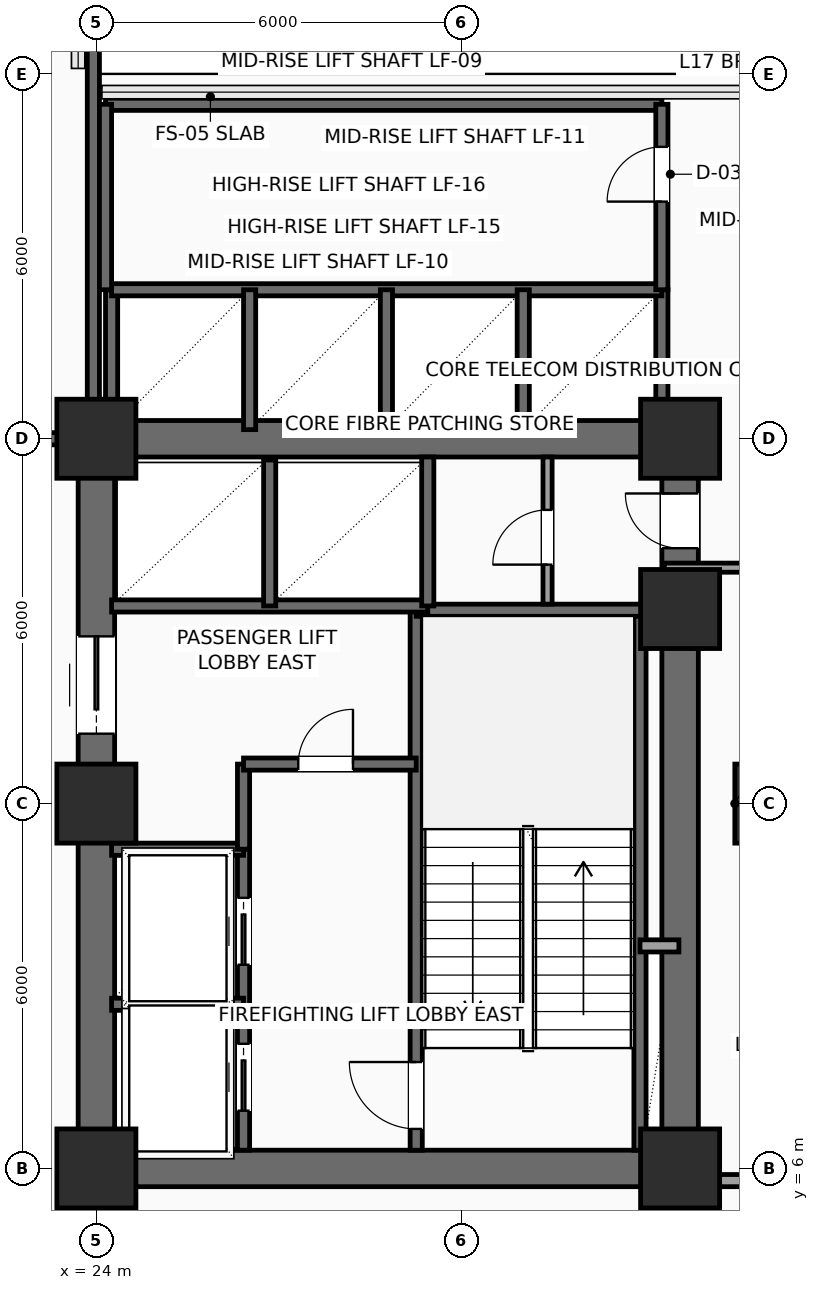
"""IFC4 building model, lengths in metres.
Left out: names, types, materials, properties, quantities, classifications, styles, units other than length and angle.
Written with IfcOpenShell. Run it as: python <this file> out.ifc"""

import sys

from ifc_helpers import new_model, si_unit, direction, frame, frame_2d, origin, origin_2d, place, context, subcontext, project, spatial, rectangle, extrude, element, fill, save


model = new_model("IFC4")
c1 = context("Model", 3, precision=1e-05, world=origin(), true_north=direction((0.0, 1.0)))
c2 = subcontext(c1, "Body", "Model", "MODEL_VIEW")
j1 = project(units=[si_unit("LENGTHUNIT", "METRE"), si_unit("PLANEANGLEUNIT", "RADIAN")], contexts=[c1])
p1 = place(None, origin())
s1 = spatial("IfcSite", under=j1, at=p1, CompositionType="ELEMENT")
p2 = place(p1, origin())
s2 = spatial("IfcBuilding", under=s1, at=p2, CompositionType="ELEMENT")
p3 = place(p2, frame((0.0, 0.0, 75.3)))
s3 = spatial("IfcBuildingStorey", under=s2, at=p3, CompositionType="ELEMENT", Elevation=75.3)
for number, where, z_axis, x_axis in (
    (1, (24.0, 6.0, 0.0), (0.0, 0.0, 1.0), (1.0, 0.0, 0.0)),
    (2, (24.0, 12.0, 0.0), (0.0, 0.0, 1.0), (1.0, 0.0, 0.0)),
    (3, (24.0, 18.0, 0.0), (0.0, 0.0, 1.0), (1.0, 0.0, 0.0)),
    (4, (33.6, 6.0, 0.0), (0.0, 0.0, 1.0), (1.0, 0.0, 0.0)),
    (5, (33.6, 15.2, 0.0), (0.0, 0.0, 1.0), (1.0, 0.0, 0.0)),
    (6, (33.6, 18.0, 0.0), (0.0, 0.0, 1.0), (1.0, 0.0, 0.0)),
    (7, (35.15, 12.0, 0.0), (0.0, 0.0, 1.0), (1.0, 0.0, 0.0)),
):
    element("IfcColumn", number, at=place(p3, frame(where, z_axis=z_axis, x_axis=x_axis)), inside=s3, PredefinedType="COLUMN", context=c2, shape_type="SweptSolid", body=[
        extrude(rectangle(XDim=1.3, YDim=1.3, at=origin_2d()), origin(), (0.0, 0.0, 1.0), 3.9),
    ])
for number, where, z_axis, x_axis in (
    (8, (24.0, 6.0, 0.0), (0.0, 0.0, 1.0), (1.0, 0.0, 0.0)),
    (9, (24.0, 18.0, 0.0), (0.0, 0.0, 1.0), (1.0, 0.0, 0.0)),
):
    element("IfcWall", number, at=place(p3, frame(where, z_axis=z_axis, x_axis=x_axis)), inside=s3, PredefinedType="SHEAR", context=c2, shape_type="SweptSolid", body=[
        extrude(rectangle(XDim=9.6, YDim=0.6, at=frame_2d((4.8, 0.0))), origin(), (0.0, 0.0, 1.0), 3.65),
    ])
p4 = place(p3, frame((24.0, 6.0, 0.0), z_axis=(0.0, 0.0, 1.0), x_axis=(0.0, 1.0, 0.0)))
e10 = element("IfcWall", 10, at=p4, inside=s3, PredefinedType="SHEAR", context=c2, shape_type="SweptSolid", body=[
    extrude(rectangle(XDim=12.0, YDim=0.6, at=frame_2d((6.0, 0.0))), origin(), (0.0, 0.0, 1.0), 3.65),
])
p5 = place(p4, frame((7.15, 0.0, 0.0)))
e11 = element("IfcOpeningElement", 11, at=p5, cuts=e10, PredefinedType="OPENING", context=c2, shape_type="SweptSolid", body=[
    extrude(rectangle(XDim=1.6, YDim=2.3, at=frame_2d((0.8, 1.15))), frame((0.0, 0.31, 0.0), z_axis=(0.0, -1.0, 0.0), x_axis=(1.0, 0.0, 0.0)), (0.0, 0.0, 1.0), 0.62),
])
p6 = place(p3, frame((33.6, 6.0, 0.0), z_axis=(0.0, 0.0, 1.0), x_axis=(0.0, 1.0, 0.0)))
e12 = element("IfcWall", 12, at=p6, inside=s3, PredefinedType="SHEAR", context=c2, shape_type="SweptSolid", body=[
    extrude(rectangle(XDim=12.0, YDim=0.6, at=frame_2d((6.0, 0.0))), origin(), (0.0, 0.0, 1.0), 3.65),
])
p7 = place(p6, frame((10.2, 0.0, 0.0)))
e13 = element("IfcOpeningElement", 13, at=p7, cuts=e12, PredefinedType="OPENING", context=c2, shape_type="SweptSolid", body=[
    extrude(rectangle(XDim=0.9, YDim=2.15, at=frame_2d((0.45, 1.075))), frame((0.0, 0.31, 0.0), z_axis=(0.0, -1.0, 0.0), x_axis=(1.0, 0.0, 0.0)), (0.0, 0.0, 1.0), 0.62),
])
p8 = place(p3, frame((29.26, 6.3, 0.0), z_axis=(0.0, 0.0, 1.0), x_axis=(0.0, 1.0, 0.0)))
e14 = element("IfcWall", 14, at=p8, inside=s3, PredefinedType="SHEAR", context=c2, shape_type="SweptSolid", body=[
    extrude(rectangle(XDim=8.88, YDim=0.2, at=frame_2d((4.44, 0.0))), origin(), (0.0, 0.0, 1.0), 3.65),
])
p9 = place(p8, frame((0.35, 0.0, 0.0)))
e15 = element("IfcOpeningElement", 15, at=p9, cuts=e14, PredefinedType="OPENING", context=c2, shape_type="SweptSolid", body=[
    extrude(rectangle(XDim=1.1, YDim=2.2, at=frame_2d((0.55, 1.1))), frame((0.0, 0.11, 0.0), z_axis=(0.0, -1.0, 0.0), x_axis=(1.0, 0.0, 0.0)), (0.0, 0.0, 1.0), 0.22),
])
p10 = place(p3, frame((32.94, 6.3, 0.0), z_axis=(0.0, 0.0, 1.0), x_axis=(0.0, 1.0, 0.0)))
e16 = element("IfcWall", 16, at=p10, inside=s3, PredefinedType="SHEAR", context=c2, shape_type="SweptSolid", body=[
    extrude(rectangle(XDim=8.88, YDim=0.2, at=frame_2d((4.44, 0.0))), origin(), (0.0, 0.0, 1.0), 3.65),
])
p11 = place(p3, frame((29.26, 15.18, 0.0), z_axis=(0.0, 0.0, 1.0), x_axis=(1.0, 0.0, 0.0)))
e17 = element("IfcWall", 17, at=p11, inside=s3, PredefinedType="SHEAR", context=c2, shape_type="SweptSolid", body=[
    extrude(rectangle(XDim=4.04, YDim=0.2, at=frame_2d((2.02, 0.0))), origin(), (0.0, 0.0, 1.0), 3.65),
])
p12 = place(p3, frame((26.42, 6.3, 0.0), z_axis=(0.0, 0.0, 1.0), x_axis=(0.0, 1.0, 0.0)))
e18 = element("IfcWall", 18, at=p12, inside=s3, PredefinedType="SHEAR", context=c2, shape_type="SweptSolid", body=[
    extrude(rectangle(XDim=4.95, YDim=0.2, at=frame_2d((2.475, 0.0))), origin(), (0.0, 0.0, 1.0), 3.65),
])
p13 = place(p12, frame((0.65, 0.0, 0.0)))
e19 = element("IfcOpeningElement", 19, at=p13, cuts=e18, PredefinedType="OPENING", context=c2, shape_type="SweptSolid", body=[
    extrude(rectangle(XDim=1.1, YDim=2.2, at=frame_2d((0.55, 1.1))), frame((0.0, 0.11, 0.0), z_axis=(0.0, -1.0, 0.0), x_axis=(1.0, 0.0, 0.0)), (0.0, 0.0, 1.0), 0.22),
])
p14 = place(p12, frame((3.05, 0.0, 0.0)))
e20 = element("IfcOpeningElement", 20, at=p14, cuts=e18, PredefinedType="OPENING", context=c2, shape_type="SweptSolid", body=[
    extrude(rectangle(XDim=1.1, YDim=2.2, at=frame_2d((0.55, 1.1))), frame((0.0, 0.11, 0.0), z_axis=(0.0, -1.0, 0.0), x_axis=(1.0, 0.0, 0.0)), (0.0, 0.0, 1.0), 0.22),
])
for number, where, z_axis, x_axis in (
    (21, (24.25, 8.7, 0.0), (0.0, 0.0, 1.0), (1.0, 0.0, 0.0)),
    (22, (24.25, 11.25, 0.0), (0.0, 0.0, 1.0), (1.0, 0.0, 0.0)),
):
    element("IfcWall", number, at=place(p3, frame(where, z_axis=z_axis, x_axis=x_axis)), inside=s3, PredefinedType="SHEAR", context=c2, shape_type="SweptSolid", body=[
        extrude(rectangle(XDim=2.17, YDim=0.2, at=frame_2d((1.085, 0.0))), origin(), (0.0, 0.0, 1.0), 3.65),
    ])
p15 = place(p3, frame((26.42, 11.25, 0.0), z_axis=(0.0, 0.0, 1.0), x_axis=(0.0, 1.0, 0.0)))
e23 = element("IfcWall", 23, at=p15, inside=s3, PredefinedType="SHEAR", context=c2, shape_type="SweptSolid", body=[
    extrude(rectangle(XDim=1.4, YDim=0.2, at=frame_2d((0.7, 0.0))), origin(), (0.0, 0.0, 1.0), 3.65),
])
p16 = place(p3, frame((26.42, 12.65, 0.0), z_axis=(0.0, 0.0, 1.0), x_axis=(1.0, 0.0, 0.0)))
e24 = element("IfcWall", 24, at=p16, inside=s3, PredefinedType="SHEAR", context=c2, shape_type="SweptSolid", body=[
    extrude(rectangle(XDim=2.84, YDim=0.2, at=frame_2d((1.42, 0.0))), origin(), (0.0, 0.0, 1.0), 3.65),
])
p17 = place(p16, frame((0.9, 0.0, 0.0)))
e25 = element("IfcOpeningElement", 25, at=p17, cuts=e24, PredefinedType="OPENING", context=c2, shape_type="SweptSolid", body=[
    extrude(rectangle(XDim=0.9, YDim=2.15, at=frame_2d((0.45, 1.075))), frame((0.0, 0.11, 0.0), z_axis=(0.0, -1.0, 0.0), x_axis=(1.0, 0.0, 0.0)), (0.0, 0.0, 1.0), 0.22),
])
p18 = place(p3, frame((32.94, 9.66, 0.0), z_axis=(0.0, 0.0, 1.0), x_axis=(1.0, 0.0, 0.0)))
e26 = element("IfcWall", 26, at=p18, inside=s3, PredefinedType="SOLIDWALL", context=c2, shape_type="SweptSolid", body=[
    extrude(rectangle(XDim=0.64, YDim=0.2, at=frame_2d((0.32, 0.0))), origin(), (0.0, 0.0, 1.0), 3.65),
])
p19 = place(p3, frame((24.25, 15.25, 0.0), z_axis=(0.0, 0.0, 1.0), x_axis=(1.0, 0.0, 0.0)))
e27 = element("IfcWall", 27, at=p19, inside=s3, PredefinedType="SHEAR", context=c2, shape_type="SweptSolid", body=[
    extrude(rectangle(XDim=5.2, YDim=0.2, at=frame_2d((2.6, 0.0))), origin(), (0.0, 0.0, 1.0), 3.65),
])
p20 = place(p3, frame((26.85, 15.25, 0.0), z_axis=(0.0, 0.0, 1.0), x_axis=(0.0, 1.0, 0.0)))
e28 = element("IfcWall", 28, at=p20, inside=s3, PredefinedType="SHEAR", context=c2, shape_type="SweptSolid", body=[
    extrude(rectangle(XDim=2.4, YDim=0.2, at=frame_2d((1.2, 0.0))), origin(), (0.0, 0.0, 1.0), 3.65),
])
p21 = place(p3, frame((29.45, 15.25, 0.0), z_axis=(0.0, 0.0, 1.0), x_axis=(0.0, 1.0, 0.0)))
e29 = element("IfcWall", 29, at=p21, inside=s3, PredefinedType="SHEAR", context=c2, shape_type="SweptSolid", body=[
    extrude(rectangle(XDim=2.45, YDim=0.2, at=frame_2d((1.225, 0.0))), origin(), (0.0, 0.0, 1.0), 3.65),
])
p22 = place(p3, frame((31.42, 15.28, 0.0), z_axis=(0.0, 0.0, 1.0), x_axis=(0.0, 1.0, 0.0)))
e30 = element("IfcWall", 30, at=p22, inside=s3, PredefinedType="PARTITIONING", context=c2, shape_type="SweptSolid", body=[
    extrude(rectangle(XDim=2.42, YDim=0.15, at=frame_2d((1.21, 0.0))), origin(), (0.0, 0.0, 1.0), 3.65),
])
p23 = place(p22, frame((0.65, 0.0, 0.0)))
e31 = element("IfcOpeningElement", 31, at=p23, cuts=e30, PredefinedType="OPENING", context=c2, shape_type="SweptSolid", body=[
    extrude(rectangle(XDim=0.9, YDim=2.15, at=frame_2d((0.45, 1.075))), frame((0.0, 0.085, 0.0), z_axis=(0.0, -1.0, 0.0), x_axis=(1.0, 0.0, 0.0)), (0.0, 0.0, 1.0), 0.17),
])
p24 = place(p3, frame((20.45, 18.0, 0.0), z_axis=(0.0, 0.0, 1.0), x_axis=(1.0, 0.0, 0.0)))
e32 = element("IfcWall", 32, at=p24, inside=s3, PredefinedType="SHEAR", context=c2, shape_type="SweptSolid", body=[
    extrude(rectangle(XDim=3.5, YDim=0.2, at=frame_2d((1.75, 0.0))), origin(), (0.0, 0.0, 1.0), 3.65),
])
p25 = place(p24, frame((0.95, 0.0, 0.0)))
e33 = element("IfcOpeningElement", 33, at=p25, cuts=e32, PredefinedType="OPENING", context=c2, shape_type="SweptSolid", body=[
    extrude(rectangle(XDim=1.6, YDim=2.3, at=frame_2d((0.8, 1.15))), frame((0.0, 0.11, 0.0), z_axis=(0.0, -1.0, 0.0), x_axis=(1.0, 0.0, 0.0)), (0.0, 0.0, 1.0), 0.22),
])
p26 = place(p3, frame((23.95, 18.0, 0.0), z_axis=(0.0, 0.0, 1.0), x_axis=(0.0, 1.0, 0.0)))
e34 = element("IfcWall", 34, at=p26, inside=s3, PredefinedType="SHEAR", context=c2, shape_type="SweptSolid", body=[
    extrude(rectangle(XDim=9.3, YDim=0.2, at=frame_2d((4.65, 0.0))), origin(), (0.0, 0.0, 1.0), 3.65),
])
for number, where, z_axis, x_axis in (
    (35, (33.3, 18.1, 0.0), (0.0, 0.0, 1.0), (0.0, 1.0, 0.0)),
    (36, (24.25, 18.1, 0.0), (0.0, 0.0, 1.0), (0.0, 1.0, 0.0)),
):
    element("IfcWall", number, at=place(p3, frame(where, z_axis=z_axis, x_axis=x_axis)), inside=s3, PredefinedType="SHEAR", context=c2, shape_type="SweptSolid", body=[
        extrude(rectangle(XDim=2.35, YDim=0.2, at=frame_2d((1.175, 0.0))), origin(), (0.0, 0.0, 1.0), 3.65),
    ])
p27 = place(p3, frame((24.25, 20.45, 0.0), z_axis=(0.0, 0.0, 1.0), x_axis=(1.0, 0.0, 0.0)))
e37 = element("IfcWall", 37, at=p27, inside=s3, PredefinedType="SHEAR", context=c2, shape_type="SweptSolid", body=[
    extrude(rectangle(XDim=9.05, YDim=0.2, at=frame_2d((4.525, 0.0))), origin(), (0.0, 0.0, 1.0), 3.65),
])
for number, where, z_axis, x_axis in (
    (38, (26.52, 18.15, 0.0), (0.0, 0.0, 1.0), (0.0, 1.0, 0.0)),
    (39, (28.77, 18.15, 0.0), (0.0, 0.0, 1.0), (0.0, 1.0, 0.0)),
    (40, (31.02, 18.15, 0.0), (0.0, 0.0, 1.0), (0.0, 1.0, 0.0)),
):
    element("IfcWall", number, at=place(p3, frame(where, z_axis=z_axis, x_axis=x_axis)), inside=s3, PredefinedType="SHEAR", context=c2, shape_type="SweptSolid", body=[
        extrude(rectangle(XDim=2.3, YDim=0.2, at=frame_2d((1.15, 0.0))), origin(), (0.0, 0.0, 1.0), 3.65),
    ])
p28 = place(p3, frame((24.15, 23.5, 0.0), z_axis=(0.0, 0.0, 1.0), x_axis=(1.0, 0.0, 0.0)))
e41 = element("IfcWall", 41, at=p28, inside=s3, PredefinedType="SHEAR", context=c2, shape_type="SweptSolid", body=[
    extrude(rectangle(XDim=9.15, YDim=0.2, at=frame_2d((4.575, 0.0))), origin(), (0.0, 0.0, 1.0), 3.65),
])
p29 = place(p3, frame((33.3, 20.45, 0.0), z_axis=(0.0, 0.0, 1.0), x_axis=(0.0, 1.0, 0.0)))
e42 = element("IfcWall", 42, at=p29, inside=s3, PredefinedType="SHEAR", context=c2, shape_type="SweptSolid", body=[
    extrude(rectangle(XDim=3.05, YDim=0.2, at=frame_2d((1.525, 0.0))), origin(), (0.0, 0.0, 1.0), 3.65),
])
p30 = place(p29, frame((1.45, 0.0, 0.0)))
e43 = element("IfcOpeningElement", 43, at=p30, cuts=e42, PredefinedType="OPENING", context=c2, shape_type="SweptSolid", body=[
    extrude(rectangle(XDim=0.9, YDim=2.15, at=frame_2d((0.45, 1.075))), frame((0.0, 0.11, 0.0), z_axis=(0.0, -1.0, 0.0), x_axis=(1.0, 0.0, 0.0)), (0.0, 0.0, 1.0), 0.22),
])
p31 = place(p3, frame((24.15, 20.45, 0.0), z_axis=(0.0, 0.0, 1.0), x_axis=(0.0, 1.0, 0.0)))
e44 = element("IfcWall", 44, at=p31, inside=s3, PredefinedType="SHEAR", context=c2, shape_type="SweptSolid", body=[
    extrude(rectangle(XDim=3.05, YDim=0.2, at=frame_2d((1.525, 0.0))), origin(), (0.0, 0.0, 1.0), 3.65),
])
p32 = place(p3, frame((36.15, 15.88, 0.0), z_axis=(0.0, 0.0, 1.0), x_axis=(-1.0, 0.0, 0.0)))
e45 = element("IfcWall", 45, at=p32, inside=s3, PredefinedType="PARTITIONING", context=c2, shape_type="SweptSolid", body=[
    extrude(rectangle(XDim=2.81, YDim=0.15, at=frame_2d((1.405, 0.0))), origin(), (0.0, 0.0, 1.0), 3.65),
])
p33 = place(p3, frame((33.65, 5.8, 0.0), z_axis=(0.0, 0.0, 1.0), x_axis=(1.0, 0.0, 0.0)))
e46 = element("IfcWall", 46, at=p33, inside=s3, PredefinedType="PARTITIONING", context=c2, shape_type="SweptSolid", body=[
    extrude(rectangle(XDim=2.5, YDim=0.2, at=frame_2d((1.25, 0.0))), origin(), (0.0, 0.0, 1.0), 2.992),
])
p34 = place(p5, origin())
e47 = element("IfcDoor", 47, at=p34, inside=s3, OperationType="DOUBLE_DOOR_SLIDING", PredefinedType="DOOR", context=c2, shape_type="SweptSolid", body=[
    extrude(rectangle(XDim=1.6, YDim=2.3, at=frame_2d((0.8, 1.15))), frame((0.0, 0.025, 0.0), z_axis=(0.0, -1.0, 0.0), x_axis=(1.0, 0.0, 0.0)), (0.0, 0.0, 1.0), 0.05),
])
fill(e11, e47)
p35 = place(p7, origin())
e48 = element("IfcDoor", 48, at=p35, inside=s3, OperationType="SINGLE_SWING_RIGHT", PredefinedType="DOOR", context=c2, shape_type="SweptSolid", body=[
    extrude(rectangle(XDim=0.9, YDim=2.15, at=frame_2d((0.45, 1.075))), frame((0.0, 0.025, 0.0), z_axis=(0.0, -1.0, 0.0), x_axis=(1.0, 0.0, 0.0)), (0.0, 0.0, 1.0), 0.05),
])
fill(e13, e48)
p36 = place(p9, origin())
e49 = element("IfcDoor", 49, at=p36, inside=s3, OperationType="SINGLE_SWING_RIGHT", PredefinedType="DOOR", context=c2, shape_type="SweptSolid", body=[
    extrude(rectangle(XDim=1.1, YDim=2.2, at=frame_2d((0.55, 1.1))), frame((0.0, 0.025, 0.0), z_axis=(0.0, -1.0, 0.0), x_axis=(1.0, 0.0, 0.0)), (0.0, 0.0, 1.0), 0.05),
])
fill(e15, e49)
p37 = place(p13, origin())
e50 = element("IfcDoor", 50, at=p37, inside=s3, OperationType="SLIDING_TO_LEFT", PredefinedType="DOOR", context=c2, shape_type="SweptSolid", body=[
    extrude(rectangle(XDim=1.1, YDim=2.2, at=frame_2d((0.55, 1.1))), frame((0.0, 0.025, 0.0), z_axis=(0.0, -1.0, 0.0), x_axis=(1.0, 0.0, 0.0)), (0.0, 0.0, 1.0), 0.05),
])
fill(e19, e50)
p38 = place(p14, origin())
e51 = element("IfcDoor", 51, at=p38, inside=s3, OperationType="SLIDING_TO_LEFT", PredefinedType="DOOR", context=c2, shape_type="SweptSolid", body=[
    extrude(rectangle(XDim=1.1, YDim=2.2, at=frame_2d((0.55, 1.1))), frame((0.0, 0.025, 0.0), z_axis=(0.0, -1.0, 0.0), x_axis=(1.0, 0.0, 0.0)), (0.0, 0.0, 1.0), 0.05),
])
fill(e20, e51)
p39 = place(p17, origin())
e52 = element("IfcDoor", 52, at=p39, inside=s3, OperationType="SINGLE_SWING_RIGHT", PredefinedType="DOOR", context=c2, shape_type="SweptSolid", body=[
    extrude(rectangle(XDim=0.9, YDim=2.15, at=frame_2d((0.45, 1.075))), frame((0.0, 0.025, 0.0), z_axis=(0.0, -1.0, 0.0), x_axis=(1.0, 0.0, 0.0)), (0.0, 0.0, 1.0), 0.05),
])
fill(e25, e52)
p40 = place(p23, origin())
e53 = element("IfcDoor", 53, at=p40, inside=s3, OperationType="SINGLE_SWING_LEFT", PredefinedType="DOOR", context=c2, shape_type="SweptSolid", body=[
    extrude(rectangle(XDim=0.9, YDim=2.15, at=frame_2d((0.45, 1.075))), frame((0.0, 0.025, 0.0), z_axis=(0.0, -1.0, 0.0), x_axis=(1.0, 0.0, 0.0)), (0.0, 0.0, 1.0), 0.05),
])
fill(e31, e53)
p41 = place(p30, origin())
e54 = element("IfcDoor", 54, at=p41, inside=s3, OperationType="SINGLE_SWING_LEFT", PredefinedType="DOOR", context=c2, shape_type="SweptSolid", body=[
    extrude(rectangle(XDim=0.9, YDim=2.15, at=frame_2d((0.45, 1.075))), frame((0.0, 0.025, 0.0), z_axis=(0.0, -1.0, 0.0), x_axis=(1.0, 0.0, 0.0)), (0.0, 0.0, 1.0), 0.05),
])
fill(e43, e54)
save(model, sys.argv[1])
